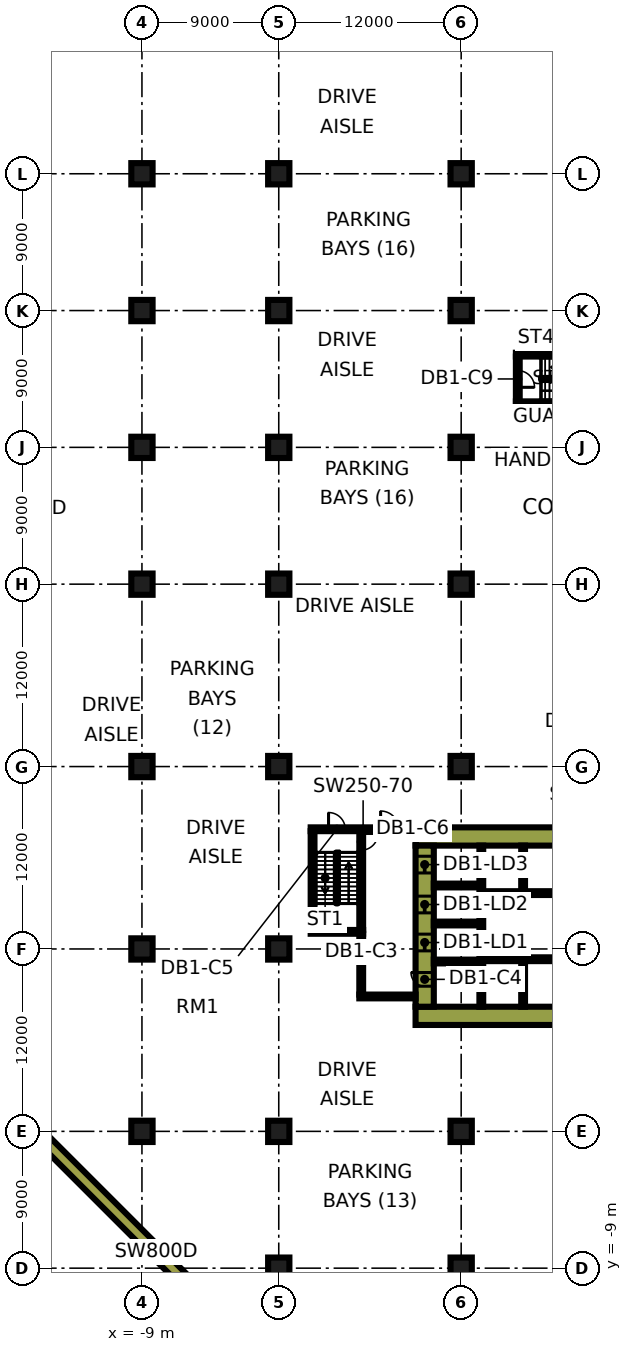
"""IFC4 building model, lengths in metres.
Left out: names, types, materials, properties, quantities, classifications, styles, units other than length and angle.
Written with IfcOpenShell. Run it as: python <this file> out.ifc"""

import sys

from ifc_helpers import new_model, si_unit, direction, frame, frame_2d, origin, origin_2d, place, context, subcontext, project, spatial, rectangle, extrude, element, fill, save


model = new_model("IFC4")
c1 = context("Model", 3, precision=1e-05, world=origin(), true_north=direction((0.0, 1.0)))
c2 = subcontext(c1, "Body", "Model", "MODEL_VIEW")
j1 = project(units=[si_unit("LENGTHUNIT", "METRE"), si_unit("PLANEANGLEUNIT", "RADIAN")], contexts=[c1])
p1 = place(None, origin())
s1 = spatial("IfcSite", under=j1, at=p1, CompositionType="ELEMENT")
p2 = place(p1, origin())
s2 = spatial("IfcBuilding", under=s1, at=p2, CompositionType="ELEMENT")
p3 = place(p2, frame((0.0, 0.0, -4.5)))
s3 = spatial("IfcBuildingStorey", under=s2, at=p3, CompositionType="ELEMENT", Elevation=-4.5)
for number, where, z_axis, x_axis in (
    (1, (-9.0, 0.0, 0.0), (0.0, 0.0, 1.0), (1.0, 0.0, 0.0)),
    (2, (-9.0, 12.0, 0.0), (0.0, 0.0, 1.0), (1.0, 0.0, 0.0)),
    (3, (-9.0, 24.0, 0.0), (0.0, 0.0, 1.0), (1.0, 0.0, 0.0)),
    (4, (-9.0, 36.0, 0.0), (0.0, 0.0, 1.0), (1.0, 0.0, 0.0)),
    (5, (-9.0, 45.0, 0.0), (0.0, 0.0, 1.0), (1.0, 0.0, 0.0)),
    (6, (-9.0, 54.0, 0.0), (0.0, 0.0, 1.0), (1.0, 0.0, 0.0)),
    (7, (-9.0, 63.0, 0.0), (0.0, 0.0, 1.0), (1.0, 0.0, 0.0)),
    (8, (0.0, -9.0, 0.0), (0.0, 0.0, 1.0), (1.0, 0.0, 0.0)),
    (9, (0.0, 0.0, 0.0), (0.0, 0.0, 1.0), (1.0, 0.0, 0.0)),
    (10, (0.0, 12.0, 0.0), (0.0, 0.0, 1.0), (1.0, 0.0, 0.0)),
    (11, (0.0, 24.0, 0.0), (0.0, 0.0, 1.0), (1.0, 0.0, 0.0)),
    (12, (0.0, 36.0, 0.0), (0.0, 0.0, 1.0), (1.0, 0.0, 0.0)),
    (13, (0.0, 45.0, 0.0), (0.0, 0.0, 1.0), (1.0, 0.0, 0.0)),
    (14, (0.0, 54.0, 0.0), (0.0, 0.0, 1.0), (1.0, 0.0, 0.0)),
    (15, (0.0, 63.0, 0.0), (0.0, 0.0, 1.0), (1.0, 0.0, 0.0)),
    (16, (12.0, -9.0, 0.0), (0.0, 0.0, 1.0), (1.0, 0.0, 0.0)),
    (17, (12.0, 0.0, 0.0), (0.0, 0.0, 1.0), (1.0, 0.0, 0.0)),
    (18, (12.0, 24.0, 0.0), (0.0, 0.0, 1.0), (1.0, 0.0, 0.0)),
    (19, (12.0, 36.0, 0.0), (0.0, 0.0, 1.0), (1.0, 0.0, 0.0)),
    (20, (12.0, 45.0, 0.0), (0.0, 0.0, 1.0), (1.0, 0.0, 0.0)),
    (21, (12.0, 54.0, 0.0), (0.0, 0.0, 1.0), (1.0, 0.0, 0.0)),
    (22, (12.0, 63.0, 0.0), (0.0, 0.0, 1.0), (1.0, 0.0, 0.0)),
):
    element("IfcColumn", number, at=place(p3, frame(where, z_axis=z_axis, x_axis=x_axis)), inside=s3, PredefinedType="COLUMN", context=c2, shape_type="SweptSolid", body=[
        extrude(rectangle(XDim=1.4, YDim=1.4, at=origin_2d()), origin(), (0.0, 0.0, 1.0), 4.5),
    ])
p4 = place(p3, frame((9.0, 7.6, 0.0), z_axis=(0.0, 0.0, 1.0), x_axis=(1.0, 0.0, 0.0)))
e23 = element("IfcWall", 23, at=p4, inside=s3, PredefinedType="SHEAR", context=c2, shape_type="SweptSolid", body=[
    extrude(rectangle(XDim=25.0, YDim=1.2, at=frame_2d((12.5, 0.0))), origin(), (0.0, 0.0, 1.0), 4.5),
])
p5 = place(p3, frame((9.0, 19.4, 0.0), z_axis=(0.0, 0.0, 1.0), x_axis=(1.0, 0.0, 0.0)))
e24 = element("IfcWall", 24, at=p5, inside=s3, PredefinedType="SHEAR", context=c2, shape_type="SweptSolid", body=[
    extrude(rectangle(XDim=25.0, YDim=1.2, at=frame_2d((12.5, 0.0))), origin(), (0.0, 0.0, 1.0), 4.5),
])
p6 = place(p5, frame((19.1, 0.0, 0.0)))
e25 = element("IfcOpeningElement", 25, at=p6, cuts=e24, PredefinedType="OPENING", context=c2, shape_type="SweptSolid", body=[
    extrude(rectangle(XDim=1.8, YDim=2.4, at=frame_2d((0.9, 1.2))), frame((0.0, 0.61, 0.0), z_axis=(0.0, -1.0, 0.0), x_axis=(1.0, 0.0, 0.0)), (0.0, 0.0, 1.0), 1.22),
])
p7 = place(p3, frame((9.6, 8.2, 0.0), z_axis=(0.0, 0.0, 1.0), x_axis=(0.0, 1.0, 0.0)))
e26 = element("IfcWall", 26, at=p7, inside=s3, PredefinedType="SHEAR", context=c2, shape_type="SweptSolid", body=[
    extrude(rectangle(XDim=10.6, YDim=1.2, at=frame_2d((5.3, 0.0))), origin(), (0.0, 0.0, 1.0), 4.5),
])
p8 = place(p7, frame((3.675, 0.0, 0.0)))
e27 = element("IfcOpeningElement", 27, at=p8, cuts=e26, PredefinedType="OPENING", context=c2, shape_type="SweptSolid", body=[
    extrude(rectangle(XDim=1.1, YDim=2.2, at=frame_2d((0.55, 1.1))), frame((0.0, 0.61, 0.0), z_axis=(0.0, -1.0, 0.0), x_axis=(1.0, 0.0, 0.0)), (0.0, 0.0, 1.0), 1.22),
])
p9 = place(p7, frame((6.175, 0.0, 0.0)))
e28 = element("IfcOpeningElement", 28, at=p9, cuts=e26, PredefinedType="OPENING", context=c2, shape_type="SweptSolid", body=[
    extrude(rectangle(XDim=1.1, YDim=2.2, at=frame_2d((0.55, 1.1))), frame((0.0, 0.61, 0.0), z_axis=(0.0, -1.0, 0.0), x_axis=(1.0, 0.0, 0.0)), (0.0, 0.0, 1.0), 1.22),
])
p10 = place(p7, frame((8.8, 0.0, 0.0)))
e29 = element("IfcOpeningElement", 29, at=p10, cuts=e26, PredefinedType="OPENING", context=c2, shape_type="SweptSolid", body=[
    extrude(rectangle(XDim=1.1, YDim=2.2, at=frame_2d((0.55, 1.1))), frame((0.0, 0.61, 0.0), z_axis=(0.0, -1.0, 0.0), x_axis=(1.0, 0.0, 0.0)), (0.0, 0.0, 1.0), 1.22),
])
p11 = place(p7, frame((1.35, 0.0, 0.0)))
e30 = element("IfcOpeningElement", 30, at=p11, cuts=e26, PredefinedType="OPENING", context=c2, shape_type="SweptSolid", body=[
    extrude(rectangle(XDim=0.9, YDim=2.1, at=frame_2d((0.45, 1.05))), frame((0.0, 0.61, 0.0), z_axis=(0.0, -1.0, 0.0), x_axis=(1.0, 0.0, 0.0)), (0.0, 0.0, 1.0), 1.22),
])
p12 = place(p3, frame((13.325, 8.2, 0.0), z_axis=(0.0, 0.0, 1.0), x_axis=(0.0, 1.0, 0.0)))
e31 = element("IfcWall", 31, at=p12, inside=s3, PredefinedType="SHEAR", context=c2, shape_type="SweptSolid", body=[
    extrude(rectangle(XDim=10.6, YDim=0.25, at=frame_2d((5.3, 0.0))), origin(), (0.0, 0.0, 1.0), 4.5),
])
p13 = place(p3, frame((13.45, 11.325, 0.0), z_axis=(0.0, 0.0, 1.0), x_axis=(1.0, 0.0, 0.0)))
e32 = element("IfcWall", 32, at=p13, inside=s3, PredefinedType="SHEAR", context=c2, shape_type="SweptSolid", body=[
    extrude(rectangle(XDim=19.35, YDim=0.25, at=frame_2d((9.675, 0.0))), origin(), (0.0, 0.0, 1.0), 4.5),
])
p14 = place(p3, frame((13.45, 15.675, 0.0), z_axis=(0.0, 0.0, 1.0), x_axis=(1.0, 0.0, 0.0)))
e33 = element("IfcWall", 33, at=p14, inside=s3, PredefinedType="SHEAR", context=c2, shape_type="SweptSolid", body=[
    extrude(rectangle(XDim=13.75, YDim=0.25, at=frame_2d((6.875, 0.0))), origin(), (0.0, 0.0, 1.0), 4.5),
])
for number, where, z_axis, x_axis in (
    (34, (10.2, 11.175, 0.0), (0.0, 0.0, 1.0), (1.0, 0.0, 0.0)),
    (35, (10.2, 13.675, 0.0), (0.0, 0.0, 1.0), (1.0, 0.0, 0.0)),
    (36, (10.2, 16.175, 0.0), (0.0, 0.0, 1.0), (1.0, 0.0, 0.0)),
    (37, (16.075, 8.2, 0.0), (0.0, 0.0, 1.0), (0.0, 1.0, 0.0)),
    (38, (16.075, 15.8, 0.0), (0.0, 0.0, 1.0), (0.0, 1.0, 0.0)),
):
    element("IfcWall", number, at=place(p3, frame(where, z_axis=z_axis, x_axis=x_axis)), inside=s3, PredefinedType="SHEAR", context=c2, shape_type="SweptSolid", body=[
        extrude(rectangle(XDim=3.0, YDim=0.25, at=frame_2d((1.5, 0.0))), origin(), (0.0, 0.0, 1.0), 4.5),
    ])
p15 = place(p3, frame((2.1, 19.875, 0.0), z_axis=(0.0, 0.0, 1.0), x_axis=(1.0, 0.0, 0.0)))
e39 = element("IfcWall", 39, at=p15, inside=s3, PredefinedType="SHEAR", context=c2, shape_type="SweptSolid", body=[
    extrude(rectangle(XDim=6.9, YDim=0.25, at=frame_2d((3.45, 0.0))), origin(), (0.0, 0.0, 1.0), 4.5),
])
p16 = place(p15, frame((1.175, 0.0, 0.0)))
e40 = element("IfcOpeningElement", 40, at=p16, cuts=e39, PredefinedType="OPENING", context=c2, shape_type="SweptSolid", body=[
    extrude(rectangle(XDim=1.1, YDim=2.2, at=frame_2d((0.55, 1.1))), frame((0.0, 0.135, 0.0), z_axis=(0.0, -1.0, 0.0), x_axis=(1.0, 0.0, 0.0)), (0.0, 0.0, 1.0), 0.27),
])
p17 = place(p15, frame((4.6, 0.0, 0.0)))
e41 = element("IfcOpeningElement", 41, at=p17, cuts=e39, PredefinedType="OPENING", context=c2, shape_type="SweptSolid", body=[
    extrude(rectangle(XDim=1.2, YDim=2.2, at=frame_2d((0.6, 1.1))), frame((0.0, 0.135, 0.0), z_axis=(0.0, -1.0, 0.0), x_axis=(1.0, 0.0, 0.0)), (0.0, 0.0, 1.0), 0.27),
])
p18 = place(p3, frame((2.1, 13.125, 0.0), z_axis=(0.0, 0.0, 1.0), x_axis=(1.0, 0.0, 0.0)))
e42 = element("IfcWall", 42, at=p18, inside=s3, PredefinedType="SHEAR", context=c2, shape_type="SweptSolid", body=[
    extrude(rectangle(XDim=3.45, YDim=0.25, at=frame_2d((1.725, 0.0))), origin(), (0.0, 0.0, 1.0), 4.5),
])
p19 = place(p3, frame((2.225, 13.25, 0.0), z_axis=(0.0, 0.0, 1.0), x_axis=(0.0, 1.0, 0.0)))
e43 = element("IfcWall", 43, at=p19, inside=s3, PredefinedType="SHEAR", context=c2, shape_type="SweptSolid", body=[
    extrude(rectangle(XDim=6.5, YDim=0.25, at=frame_2d((3.25, 0.0))), origin(), (0.0, 0.0, 1.0), 4.5),
])
p20 = place(p3, frame((5.425, 13.25, 0.0), z_axis=(0.0, 0.0, 1.0), x_axis=(0.0, 1.0, 0.0)))
e44 = element("IfcWall", 44, at=p20, inside=s3, PredefinedType="SHEAR", context=c2, shape_type="SweptSolid", body=[
    extrude(rectangle(XDim=6.5, YDim=0.25, at=frame_2d((3.25, 0.0))), origin(), (0.0, 0.0, 1.0), 4.5),
])
p21 = place(p20, frame((5.25, 0.0, 0.0)))
e45 = element("IfcOpeningElement", 45, at=p21, cuts=e44, PredefinedType="OPENING", context=c2, shape_type="SweptSolid", body=[
    extrude(rectangle(XDim=1.1, YDim=2.2, at=frame_2d((0.55, 1.1))), frame((0.0, 0.135, 0.0), z_axis=(0.0, -1.0, 0.0), x_axis=(1.0, 0.0, 0.0)), (0.0, 0.0, 1.0), 0.27),
])
p22 = place(p3, frame((5.3, 8.875, 0.0), z_axis=(0.0, 0.0, 1.0), x_axis=(1.0, 0.0, 0.0)))
e46 = element("IfcWall", 46, at=p22, inside=s3, PredefinedType="SHEAR", context=c2, shape_type="SweptSolid", body=[
    extrude(rectangle(XDim=3.7, YDim=0.25, at=frame_2d((1.85, 0.0))), origin(), (0.0, 0.0, 1.0), 4.5),
])
p23 = place(p3, frame((5.425, 9.0, 0.0), z_axis=(0.0, 0.0, 1.0), x_axis=(0.0, 1.0, 0.0)))
e47 = element("IfcWall", 47, at=p23, inside=s3, PredefinedType="SHEAR", context=c2, shape_type="SweptSolid", body=[
    extrude(rectangle(XDim=4.0, YDim=0.25, at=frame_2d((2.0, 0.0))), origin(), (0.0, 0.0, 1.0), 4.5),
])
for number, where, z_axis, x_axis in (
    (48, (15.6, 47.9, 0.0), (0.0, 0.0, 1.0), (1.0, 0.0, 0.0)),
    (49, (15.6, 51.1, 0.0), (0.0, 0.0, 1.0), (1.0, 0.0, 0.0)),
):
    element("IfcWall", number, at=place(p3, frame(where, z_axis=z_axis, x_axis=x_axis)), inside=s3, PredefinedType="SHEAR", context=c2, shape_type="SweptSolid", body=[
        extrude(rectangle(XDim=7.0, YDim=0.25, at=frame_2d((3.5, 0.0))), origin(), (0.0, 0.0, 1.0), 4.5),
    ])
p24 = place(p3, frame((15.725, 48.025, 0.0), z_axis=(0.0, 0.0, 1.0), x_axis=(0.0, 1.0, 0.0)))
e50 = element("IfcWall", 50, at=p24, inside=s3, PredefinedType="SHEAR", context=c2, shape_type="SweptSolid", body=[
    extrude(rectangle(XDim=2.95, YDim=0.25, at=frame_2d((1.475, 0.0))), origin(), (0.0, 0.0, 1.0), 4.5),
])
p25 = place(p24, frame((0.925, 0.0, 0.0)))
e51 = element("IfcOpeningElement", 51, at=p25, cuts=e50, PredefinedType="OPENING", context=c2, shape_type="SweptSolid", body=[
    extrude(rectangle(XDim=1.1, YDim=2.2, at=frame_2d((0.55, 1.1))), frame((0.0, 0.135, 0.0), z_axis=(0.0, -1.0, 0.0), x_axis=(1.0, 0.0, 0.0)), (0.0, 0.0, 1.0), 0.27),
])
p26 = place(p3, frame((-6.294, 83.717, 0.0), z_axis=(0.0, 0.0, 1.0), x_axis=(-0.707112814855, -0.707100747466, 0.0)))
e52 = element("IfcWall", 52, at=p26, inside=s3, PredefinedType="SOLIDWALL", context=c2, shape_type="SweptSolid", body=[
    extrude(rectangle(XDim=20.231, YDim=0.8, at=frame_2d((10.116, 0.0))), origin(), (0.0, 0.0, 1.0), 4.5),
])
p27 = place(p3, frame((-20.717, 4.706, 0.0), z_axis=(0.0, 0.0, 1.0), x_axis=(0.707103370229, -0.707110192127, 0.0)))
e53 = element("IfcWall", 53, at=p27, inside=s3, PredefinedType="SOLIDWALL", context=c2, shape_type="SweptSolid", body=[
    extrude(rectangle(XDim=35.788, YDim=0.8, at=frame_2d((17.894, 0.0))), origin(), (0.0, 0.0, 1.0), 4.5),
])
p28 = place(p8, origin())
e54 = element("IfcDoor", 54, at=p28, inside=s3, OperationType="DOUBLE_DOOR_SLIDING", PredefinedType="DOOR", context=c2, shape_type="SweptSolid", body=[
    extrude(rectangle(XDim=1.1, YDim=2.2, at=frame_2d((0.55, 1.1))), frame((0.0, 0.025, 0.0), z_axis=(0.0, -1.0, 0.0), x_axis=(1.0, 0.0, 0.0)), (0.0, 0.0, 1.0), 0.05),
])
fill(e27, e54)
p29 = place(p9, origin())
e55 = element("IfcDoor", 55, at=p29, inside=s3, OperationType="DOUBLE_DOOR_SLIDING", PredefinedType="DOOR", context=c2, shape_type="SweptSolid", body=[
    extrude(rectangle(XDim=1.1, YDim=2.2, at=frame_2d((0.55, 1.1))), frame((0.0, 0.025, 0.0), z_axis=(0.0, -1.0, 0.0), x_axis=(1.0, 0.0, 0.0)), (0.0, 0.0, 1.0), 0.05),
])
fill(e28, e55)
p30 = place(p10, origin())
e56 = element("IfcDoor", 56, at=p30, inside=s3, OperationType="DOUBLE_DOOR_SLIDING", PredefinedType="DOOR", context=c2, shape_type="SweptSolid", body=[
    extrude(rectangle(XDim=1.1, YDim=2.2, at=frame_2d((0.55, 1.1))), frame((0.0, 0.025, 0.0), z_axis=(0.0, -1.0, 0.0), x_axis=(1.0, 0.0, 0.0)), (0.0, 0.0, 1.0), 0.05),
])
fill(e29, e56)
p31 = place(p21, origin())
e57 = element("IfcDoor", 57, at=p31, inside=s3, OperationType="SINGLE_SWING_RIGHT", PredefinedType="DOOR", context=c2, shape_type="SweptSolid", body=[
    extrude(rectangle(XDim=1.1, YDim=2.2, at=frame_2d((0.55, 1.1))), frame((0.0, 0.025, 0.0), z_axis=(0.0, -1.0, 0.0), x_axis=(1.0, 0.0, 0.0)), (0.0, 0.0, 1.0), 0.05),
])
fill(e45, e57)
p32 = place(p11, frame((0.9, 0.0, 0.0), z_axis=(0.0, 0.0, 1.0), x_axis=(-1.0, 0.0, 0.0)))
e58 = element("IfcDoor", 58, at=p32, inside=s3, OperationType="SINGLE_SWING_RIGHT", PredefinedType="DOOR", context=c2, shape_type="SweptSolid", body=[
    extrude(rectangle(XDim=0.9, YDim=2.1, at=frame_2d((0.45, 1.05))), frame((0.0, 0.025, 0.0), z_axis=(0.0, -1.0, 0.0), x_axis=(1.0, 0.0, 0.0)), (0.0, 0.0, 1.0), 0.05),
])
fill(e30, e58)
p33 = place(p16, origin())
e59 = element("IfcDoor", 59, at=p33, inside=s3, OperationType="SINGLE_SWING_LEFT", PredefinedType="DOOR", context=c2, shape_type="SweptSolid", body=[
    extrude(rectangle(XDim=1.1, YDim=2.2, at=frame_2d((0.55, 1.1))), frame((0.0, 0.025, 0.0), z_axis=(0.0, -1.0, 0.0), x_axis=(1.0, 0.0, 0.0)), (0.0, 0.0, 1.0), 0.05),
])
fill(e40, e59)
p34 = place(p17, origin())
e60 = element("IfcDoor", 60, at=p34, inside=s3, OperationType="SINGLE_SWING_LEFT", PredefinedType="DOOR", context=c2, shape_type="SweptSolid", body=[
    extrude(rectangle(XDim=1.2, YDim=2.2, at=frame_2d((0.6, 1.1))), frame((0.0, 0.025, 0.0), z_axis=(0.0, -1.0, 0.0), x_axis=(1.0, 0.0, 0.0)), (0.0, 0.0, 1.0), 0.05),
])
fill(e41, e60)
p35 = place(p25, frame((1.1, 0.0, 0.0), z_axis=(0.0, 0.0, 1.0), x_axis=(-1.0, 0.0, 0.0)))
e61 = element("IfcDoor", 61, at=p35, inside=s3, OperationType="SINGLE_SWING_LEFT", PredefinedType="DOOR", context=c2, shape_type="SweptSolid", body=[
    extrude(rectangle(XDim=1.1, YDim=2.2, at=frame_2d((0.55, 1.1))), frame((0.0, 0.025, 0.0), z_axis=(0.0, -1.0, 0.0), x_axis=(1.0, 0.0, 0.0)), (0.0, 0.0, 1.0), 0.05),
])
fill(e51, e61)
save(model, sys.argv[1])
